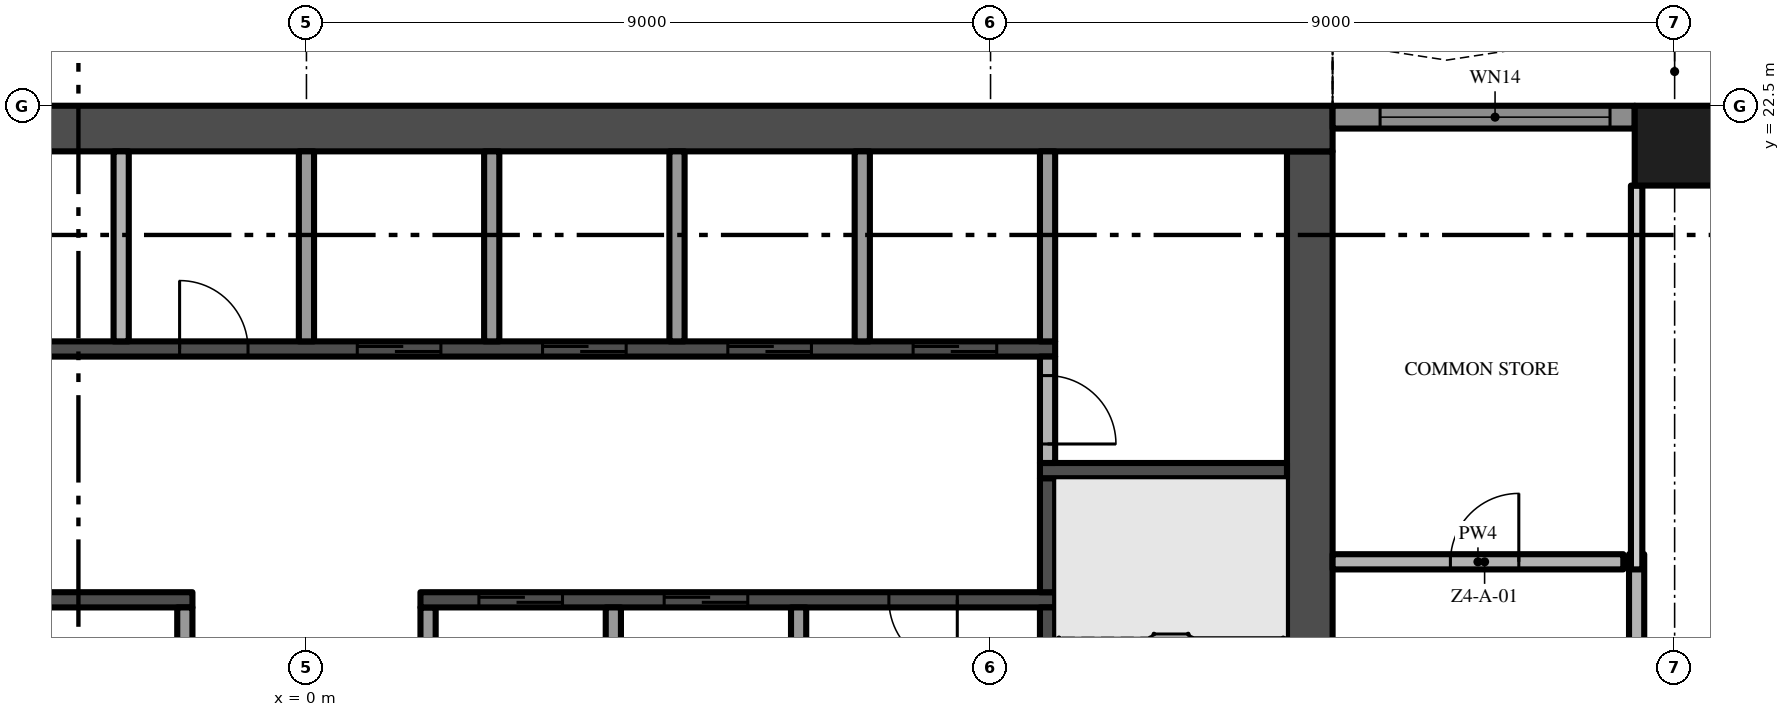
"""IFC4 building model, lengths in metres.
Left out: names, types, materials, properties, quantities, classifications, styles, units other than length and angle.
Written with IfcOpenShell. Run it as: python <this file> out.ifc"""

import sys

from ifc_helpers import new_model, si_unit, direction, frame, frame_2d, origin, origin_2d, place, context, subcontext, project, spatial, polyline, rectangle, outline, extrude, element, fill, save


model = new_model("IFC4")
c1 = context("Model", 3, precision=1e-05, world=origin(), true_north=direction((0.0, 1.0)))
c2 = subcontext(c1, "Body", "Model", "MODEL_VIEW")
j1 = project(units=[si_unit("LENGTHUNIT", "METRE"), si_unit("PLANEANGLEUNIT", "RADIAN")], contexts=[c1])
p1 = place(None, origin())
s1 = spatial("IfcSite", under=j1, at=p1, CompositionType="ELEMENT")
p2 = place(p1, origin())
s2 = spatial("IfcBuilding", under=s1, at=p2, CompositionType="ELEMENT")
p3 = place(p2, frame((0.0, 0.0, 188.2)))
s3 = spatial("IfcBuildingStorey", under=s2, at=p3, CompositionType="ELEMENT", Elevation=188.2)
p4 = place(p3, frame((13.2, 5.1, -0.3), z_axis=(0.0, 0.0, 1.0), x_axis=(0.0, 1.0, 0.0)))
e1 = element("IfcWall", 1, at=p4, inside=s3, PredefinedType="SHEAR", context=c2, shape_type="SweptSolid", body=[
    extrude(rectangle(XDim=16.8, YDim=0.6, at=frame_2d((8.4, 0.0))), origin(), (0.0, 0.0, 1.0), 3.8),
])
p5 = place(p4, frame((6.3, 0.0, 0.3)))
e2 = element("IfcOpeningElement", 2, at=p5, cuts=e1, PredefinedType="OPENING", context=c2, shape_type="SweptSolid", body=[
    extrude(rectangle(XDim=1.2, YDim=2.2, at=frame_2d((0.6, 1.1))), frame((0.0, 0.31, 0.0), z_axis=(0.0, -1.0, 0.0), x_axis=(1.0, 0.0, 0.0)), (0.0, 0.0, 1.0), 0.62),
])
p6 = place(p3, frame((13.5, 22.2, -0.3), z_axis=(0.0, 0.0, 1.0), x_axis=(-1.0, 0.0, 0.0)))
e3 = element("IfcWall", 3, at=p6, inside=s3, PredefinedType="SHEAR", context=c2, shape_type="SweptSolid", body=[
    extrude(rectangle(XDim=27.0, YDim=0.6, at=frame_2d((13.5, 0.0))), origin(), (0.0, 0.0, 1.0), 3.8),
])
p7 = place(p3, frame((18.0, 21.975, 0.0), z_axis=(0.0, 0.0, 1.0), x_axis=(1.0, 0.0, 0.0)))
e4 = element("IfcColumn", 4, at=p7, inside=s3, PredefinedType="COLUMN", context=c2, shape_type="SweptSolid", body=[
    extrude(rectangle(XDim=1.05, YDim=1.05, at=origin_2d()), origin(), (0.0, 0.0, 1.0), 3.5),
])
p8 = place(p3, frame((13.5, 22.35, 0.0), z_axis=(0.0, 0.0, 1.0), x_axis=(1.0, 0.0, 0.0)))
e5 = element("IfcWall", 5, at=p8, inside=s3, PredefinedType="SOLIDWALL", context=c2, shape_type="SweptSolid", body=[
    extrude(rectangle(XDim=3.975, YDim=0.3, at=frame_2d((1.988, 0.0))), origin(), (0.0, 0.0, 1.0), 3.5),
])
p9 = place(p8, frame((0.625, 0.0, 0.45)))
e6 = element("IfcOpeningElement", 6, at=p9, cuts=e5, PredefinedType="OPENING", context=c2, shape_type="SweptSolid", body=[
    extrude(rectangle(XDim=3.025, YDim=2.65, at=frame_2d((1.512, 1.325))), frame((0.0, 0.16, 0.0), z_axis=(0.0, -1.0, 0.0), x_axis=(1.0, 0.0, 0.0)), (0.0, 0.0, 1.0), 0.32),
])
p10 = place(p3, origin())
e7 = element("IfcWall", 7, at=p10, inside=s3, PredefinedType="USERDEFINED", context=c2, shape_type="SweptSolid", body=[
    extrude(outline(polyline([(22.5, 25.5), (21.0, 25.271), (19.5, 24.671), (18.0, 23.929), (16.5, 23.329), (15.0, 23.1), (13.5, 23.329), (13.462, 23.082), (15.0, 22.847), (16.566, 23.086), (18.102, 23.701), (19.602, 24.442), (21.066, 25.028), (22.538, 25.253), (22.5, 25.5)])), origin(), (0.0, 0.0, 1.0), 0.9),
])
p11 = place(p3, frame((-1.5, 16.0, 0.0), z_axis=(0.0, 0.0, 1.0), x_axis=(-1.0, 0.0, 0.0)))
e8 = element("IfcWall", 8, at=p11, inside=s3, PredefinedType="SHEAR", context=c2, shape_type="SweptSolid", body=[
    extrude(rectangle(XDim=8.35, YDim=0.2, at=frame_2d((4.175, 0.0))), origin(), (0.0, 0.0, 1.0), 3.5),
])
p12 = place(p11, frame((6.162, 0.0, 0.0)))
e9 = element("IfcOpeningElement", 9, at=p12, cuts=e8, PredefinedType="OPENING", context=c2, shape_type="SweptSolid", body=[
    extrude(rectangle(XDim=0.9, YDim=2.1, at=frame_2d((0.45, 1.05))), frame((0.0, 0.11, 0.0), z_axis=(0.0, -1.0, 0.0), x_axis=(1.0, 0.0, 0.0)), (0.0, 0.0, 1.0), 0.22),
])
p13 = place(p3, frame((-9.85, 19.3, 0.0), z_axis=(0.0, 0.0, 1.0), x_axis=(1.0, 0.0, 0.0)))
e10 = element("IfcWall", 10, at=p13, inside=s3, PredefinedType="SHEAR", context=c2, shape_type="SweptSolid", body=[
    extrude(rectangle(XDim=19.7, YDim=0.2, at=frame_2d((9.85, 0.0))), origin(), (0.0, 0.0, 1.0), 3.5),
])
p14 = place(p13, frame((10.519, 0.0, 0.0)))
e11 = element("IfcOpeningElement", 11, at=p14, cuts=e10, PredefinedType="OPENING", context=c2, shape_type="SweptSolid", body=[
    extrude(rectangle(XDim=1.1, YDim=2.1, at=frame_2d((0.55, 1.05))), frame((0.0, 0.11, 0.0), z_axis=(0.0, -1.0, 0.0), x_axis=(1.0, 0.0, 0.0)), (0.0, 0.0, 1.0), 0.22),
])
p15 = place(p13, frame((12.956, 0.0, 0.0)))
e12 = element("IfcOpeningElement", 12, at=p15, cuts=e10, PredefinedType="OPENING", context=c2, shape_type="SweptSolid", body=[
    extrude(rectangle(XDim=1.1, YDim=2.1, at=frame_2d((0.55, 1.05))), frame((0.0, 0.11, 0.0), z_axis=(0.0, -1.0, 0.0), x_axis=(1.0, 0.0, 0.0)), (0.0, 0.0, 1.0), 0.22),
])
p16 = place(p13, frame((15.394, 0.0, 0.0)))
e13 = element("IfcOpeningElement", 13, at=p16, cuts=e10, PredefinedType="OPENING", context=c2, shape_type="SweptSolid", body=[
    extrude(rectangle(XDim=1.1, YDim=2.1, at=frame_2d((0.55, 1.05))), frame((0.0, 0.11, 0.0), z_axis=(0.0, -1.0, 0.0), x_axis=(1.0, 0.0, 0.0)), (0.0, 0.0, 1.0), 0.22),
])
p17 = place(p13, frame((17.831, 0.0, 0.0)))
e14 = element("IfcOpeningElement", 14, at=p17, cuts=e10, PredefinedType="OPENING", context=c2, shape_type="SweptSolid", body=[
    extrude(rectangle(XDim=1.1, YDim=2.1, at=frame_2d((0.55, 1.05))), frame((0.0, 0.11, 0.0), z_axis=(0.0, -1.0, 0.0), x_axis=(1.0, 0.0, 0.0)), (0.0, 0.0, 1.0), 0.22),
])
p18 = place(p13, frame((3.306, 0.0, 0.0)))
e15 = element("IfcOpeningElement", 15, at=p18, cuts=e10, PredefinedType="OPENING", context=c2, shape_type="SweptSolid", body=[
    extrude(rectangle(XDim=0.9, YDim=2.1, at=frame_2d((0.45, 1.05))), frame((0.0, 0.11, 0.0), z_axis=(0.0, -1.0, 0.0), x_axis=(1.0, 0.0, 0.0)), (0.0, 0.0, 1.0), 0.22),
])
p19 = place(p13, frame((8.181, 0.0, 0.0)))
e16 = element("IfcOpeningElement", 16, at=p19, cuts=e10, PredefinedType="OPENING", context=c2, shape_type="SweptSolid", body=[
    extrude(rectangle(XDim=0.9, YDim=2.1, at=frame_2d((0.45, 1.05))), frame((0.0, 0.11, 0.0), z_axis=(0.0, -1.0, 0.0), x_axis=(1.0, 0.0, 0.0)), (0.0, 0.0, 1.0), 0.22),
])
p20 = place(p3, frame((-2.438, 19.4, 0.0), z_axis=(0.0, 0.0, 1.0), x_axis=(0.0, 1.0, 0.0)))
e17 = element("IfcWall", 17, at=p20, inside=s3, PredefinedType="PARTITIONING", context=c2, shape_type="SweptSolid", body=[
    extrude(rectangle(XDim=2.5, YDim=0.2, at=frame_2d((1.25, 0.0))), origin(), (0.0, 0.0, 1.0), 3.5),
])
p21 = place(p3, frame((-1.6, 13.7, 0.0), z_axis=(0.0, 0.0, 1.0), x_axis=(0.0, 1.0, 0.0)))
e18 = element("IfcWall", 18, at=p21, inside=s3, PredefinedType="PARTITIONING", context=c2, shape_type="SweptSolid", body=[
    extrude(rectangle(XDim=2.2, YDim=0.2, at=frame_2d((1.1, 0.0))), origin(), (0.0, 0.0, 1.0), 3.5),
])
p22 = place(p3, frame((0.0, 19.4, 0.0), z_axis=(0.0, 0.0, 1.0), x_axis=(0.0, 1.0, 0.0)))
e19 = element("IfcWall", 19, at=p22, inside=s3, PredefinedType="PARTITIONING", context=c2, shape_type="SweptSolid", body=[
    extrude(rectangle(XDim=2.5, YDim=0.2, at=frame_2d((1.25, 0.0))), origin(), (0.0, 0.0, 1.0), 3.5),
])
p23 = place(p3, frame((1.6, 13.7, 0.0), z_axis=(0.0, 0.0, 1.0), x_axis=(0.0, 1.0, 0.0)))
e20 = element("IfcWall", 20, at=p23, inside=s3, PredefinedType="PARTITIONING", context=c2, shape_type="SweptSolid", body=[
    extrude(rectangle(XDim=2.2, YDim=0.2, at=frame_2d((1.1, 0.0))), origin(), (0.0, 0.0, 1.0), 3.5),
])
p24 = place(p3, frame((9.85, 16.0, 0.0), z_axis=(0.0, 0.0, 1.0), x_axis=(-1.0, 0.0, 0.0)))
e21 = element("IfcWall", 21, at=p24, inside=s3, PredefinedType="SHEAR", context=c2, shape_type="SweptSolid", body=[
    extrude(rectangle(XDim=8.35, YDim=0.2, at=frame_2d((4.175, 0.0))), origin(), (0.0, 0.0, 1.0), 3.5),
])
p25 = place(p24, frame((6.481, 0.0, 0.0)))
e22 = element("IfcOpeningElement", 22, at=p25, cuts=e21, PredefinedType="OPENING", context=c2, shape_type="SweptSolid", body=[
    extrude(rectangle(XDim=1.1, YDim=2.1, at=frame_2d((0.55, 1.05))), frame((0.0, 0.11, 0.0), z_axis=(0.0, -1.0, 0.0), x_axis=(1.0, 0.0, 0.0)), (0.0, 0.0, 1.0), 0.22),
])
p26 = place(p24, frame((4.044, 0.0, 0.0)))
e23 = element("IfcOpeningElement", 23, at=p26, cuts=e21, PredefinedType="OPENING", context=c2, shape_type="SweptSolid", body=[
    extrude(rectangle(XDim=1.1, YDim=2.1, at=frame_2d((0.55, 1.05))), frame((0.0, 0.11, 0.0), z_axis=(0.0, -1.0, 0.0), x_axis=(1.0, 0.0, 0.0)), (0.0, 0.0, 1.0), 0.22),
])
p27 = place(p24, frame((1.288, 0.0, 0.0)))
e24 = element("IfcOpeningElement", 24, at=p27, cuts=e21, PredefinedType="OPENING", context=c2, shape_type="SweptSolid", body=[
    extrude(rectangle(XDim=0.9, YDim=2.1, at=frame_2d((0.45, 1.05))), frame((0.0, 0.11, 0.0), z_axis=(0.0, -1.0, 0.0), x_axis=(1.0, 0.0, 0.0)), (0.0, 0.0, 1.0), 0.22),
])
p28 = place(p3, frame((2.438, 19.4, 0.0), z_axis=(0.0, 0.0, 1.0), x_axis=(0.0, 1.0, 0.0)))
e25 = element("IfcWall", 25, at=p28, inside=s3, PredefinedType="PARTITIONING", context=c2, shape_type="SweptSolid", body=[
    extrude(rectangle(XDim=2.5, YDim=0.2, at=frame_2d((1.25, 0.0))), origin(), (0.0, 0.0, 1.0), 3.5),
])
p29 = place(p3, frame((4.037, 13.7, 0.0), z_axis=(0.0, 0.0, 1.0), x_axis=(0.0, 1.0, 0.0)))
e26 = element("IfcWall", 26, at=p29, inside=s3, PredefinedType="PARTITIONING", context=c2, shape_type="SweptSolid", body=[
    extrude(rectangle(XDim=2.2, YDim=0.2, at=frame_2d((1.1, 0.0))), origin(), (0.0, 0.0, 1.0), 3.5),
])
p30 = place(p3, frame((4.875, 19.4, 0.0), z_axis=(0.0, 0.0, 1.0), x_axis=(0.0, 1.0, 0.0)))
e27 = element("IfcWall", 27, at=p30, inside=s3, PredefinedType="PARTITIONING", context=c2, shape_type="SweptSolid", body=[
    extrude(rectangle(XDim=2.5, YDim=0.2, at=frame_2d((1.25, 0.0))), origin(), (0.0, 0.0, 1.0), 3.5),
])
p31 = place(p3, frame((6.475, 13.7, 0.0), z_axis=(0.0, 0.0, 1.0), x_axis=(0.0, 1.0, 0.0)))
e28 = element("IfcWall", 28, at=p31, inside=s3, PredefinedType="PARTITIONING", context=c2, shape_type="SweptSolid", body=[
    extrude(rectangle(XDim=2.2, YDim=0.2, at=frame_2d((1.1, 0.0))), origin(), (0.0, 0.0, 1.0), 3.5),
])
p32 = place(p3, frame((7.312, 19.4, 0.0), z_axis=(0.0, 0.0, 1.0), x_axis=(0.0, 1.0, 0.0)))
e29 = element("IfcWall", 29, at=p32, inside=s3, PredefinedType="PARTITIONING", context=c2, shape_type="SweptSolid", body=[
    extrude(rectangle(XDim=2.5, YDim=0.2, at=frame_2d((1.25, 0.0))), origin(), (0.0, 0.0, 1.0), 3.5),
])
p33 = place(p3, frame((9.75, 12.3, 0.0), z_axis=(0.0, 0.0, 1.0), x_axis=(0.0, 1.0, 0.0)))
e30 = element("IfcWall", 30, at=p33, inside=s3, PredefinedType="SHEAR", context=c2, shape_type="SweptSolid", body=[
    extrude(rectangle(XDim=3.6, YDim=0.2, at=frame_2d((1.8, 0.0))), origin(), (0.0, 0.0, 1.0), 3.5),
])
p34 = place(p3, frame((9.75, 16.1, 0.0), z_axis=(0.0, 0.0, 1.0), x_axis=(0.0, 1.0, 0.0)))
e31 = element("IfcWall", 31, at=p34, inside=s3, PredefinedType="SHEAR", context=c2, shape_type="SweptSolid", body=[
    extrude(rectangle(XDim=1.5, YDim=0.2, at=frame_2d((0.75, 0.0))), origin(), (0.0, 0.0, 1.0), 3.5),
])
p35 = place(p3, frame((9.65, 17.7, 0.0), z_axis=(0.0, 0.0, 1.0), x_axis=(1.0, 0.0, 0.0)))
e32 = element("IfcWall", 32, at=p35, inside=s3, PredefinedType="SHEAR", context=c2, shape_type="SweptSolid", body=[
    extrude(rectangle(XDim=3.25, YDim=0.2, at=frame_2d((1.625, 0.0))), origin(), (0.0, 0.0, 1.0), 3.5),
])
p36 = place(p3, frame((9.75, 19.2, 0.0), z_axis=(0.0, 0.0, 1.0), x_axis=(0.0, -1.0, 0.0)))
e33 = element("IfcWall", 33, at=p36, inside=s3, PredefinedType="PARTITIONING", context=c2, shape_type="SweptSolid", body=[
    extrude(rectangle(XDim=1.4, YDim=0.2, at=frame_2d((0.7, 0.0))), origin(), (0.0, 0.0, 1.0), 3.5),
])
p37 = place(p36, frame((0.25, 0.0, 0.0)))
e34 = element("IfcOpeningElement", 34, at=p37, cuts=e33, PredefinedType="OPENING", context=c2, shape_type="SweptSolid", body=[
    extrude(rectangle(XDim=0.9, YDim=2.1, at=frame_2d((0.45, 1.05))), frame((0.0, 0.11, 0.0), z_axis=(0.0, -1.0, 0.0), x_axis=(1.0, 0.0, 0.0)), (0.0, 0.0, 1.0), 0.22),
])
p38 = place(p3, frame((9.75, 19.4, 0.0), z_axis=(0.0, 0.0, 1.0), x_axis=(0.0, 1.0, 0.0)))
e35 = element("IfcWall", 35, at=p38, inside=s3, PredefinedType="PARTITIONING", context=c2, shape_type="SweptSolid", body=[
    extrude(rectangle(XDim=2.5, YDim=0.2, at=frame_2d((1.25, 0.0))), origin(), (0.0, 0.0, 1.0), 3.5),
])
p39 = place(p3, frame((13.5, 16.5, 0.0), z_axis=(0.0, 0.0, 1.0), x_axis=(1.0, 0.0, 0.0)))
e36 = element("IfcWall", 36, at=p39, inside=s3, PredefinedType="PARTITIONING", context=c2, shape_type="SweptSolid", body=[
    extrude(rectangle(XDim=3.825, YDim=0.2, at=frame_2d((1.913, 0.0))), origin(), (0.0, 0.0, 1.0), 3.5),
])
p40 = place(p39, frame((1.55, 0.0, 0.0)))
e37 = element("IfcOpeningElement", 37, at=p40, cuts=e36, PredefinedType="OPENING", context=c2, shape_type="SweptSolid", body=[
    extrude(rectangle(XDim=0.9, YDim=2.1, at=frame_2d((0.45, 1.05))), frame((0.0, 0.11, 0.0), z_axis=(0.0, -1.0, 0.0), x_axis=(1.0, 0.0, 0.0)), (0.0, 0.0, 1.0), 0.22),
])
p41 = place(p3, frame((17.5, 16.6, 0.0), z_axis=(0.0, 0.0, 1.0), x_axis=(0.0, -1.0, 0.0)))
e38 = element("IfcWall", 38, at=p41, inside=s3, PredefinedType="PARTITIONING", context=c2, shape_type="SweptSolid", body=[
    extrude(rectangle(XDim=2.525, YDim=0.2, at=frame_2d((1.262, 0.0))), origin(), (0.0, 0.0, 1.0), 3.5),
])
p42 = place(p41, frame((1.175, 0.0, 0.0)))
e39 = element("IfcOpeningElement", 39, at=p42, cuts=e38, PredefinedType="OPENING", context=c2, shape_type="SweptSolid", body=[
    extrude(rectangle(XDim=1.2, YDim=2.4, at=frame_2d((0.6, 1.2))), frame((0.0, 0.11, 0.0), z_axis=(0.0, -1.0, 0.0), x_axis=(1.0, 0.0, 0.0)), (0.0, 0.0, 1.0), 0.22),
])
p43 = place(p3, frame((17.5, 16.4, 0.0), z_axis=(0.0, 0.0, 1.0), x_axis=(0.0, 1.0, 0.0)))
e40 = element("IfcWall", 40, at=p43, inside=s3, PredefinedType="PARTITIONING", context=c2, shape_type="SweptSolid", body=[
    extrude(rectangle(XDim=5.05, YDim=0.15, at=frame_2d((2.525, 0.0))), origin(), (0.0, 0.0, 1.0), 3.5),
])
p44 = place(p9, origin())
e41 = element("IfcWindow", 41, at=p44, inside=s3, PartitioningType="SINGLE_PANEL", PredefinedType="WINDOW", context=c2, shape_type="SweptSolid", body=[
    extrude(rectangle(XDim=3.025, YDim=2.65, at=frame_2d((1.512, 1.325))), frame((0.0, 0.03, 0.0), z_axis=(0.0, -1.0, 0.0), x_axis=(1.0, 0.0, 0.0)), (0.0, 0.0, 1.0), 0.06),
])
fill(e6, e41)
p45 = place(p14, origin())
e42 = element("IfcDoor", 42, at=p45, inside=s3, OperationType="SLIDING_TO_RIGHT", PredefinedType="DOOR", context=c2, shape_type="SweptSolid", body=[
    extrude(rectangle(XDim=1.1, YDim=2.1, at=frame_2d((0.55, 1.05))), frame((0.0, 0.025, 0.0), z_axis=(0.0, -1.0, 0.0), x_axis=(1.0, 0.0, 0.0)), (0.0, 0.0, 1.0), 0.05),
])
fill(e11, e42)
p46 = place(p15, origin())
e43 = element("IfcDoor", 43, at=p46, inside=s3, OperationType="SLIDING_TO_RIGHT", PredefinedType="DOOR", context=c2, shape_type="SweptSolid", body=[
    extrude(rectangle(XDim=1.1, YDim=2.1, at=frame_2d((0.55, 1.05))), frame((0.0, 0.025, 0.0), z_axis=(0.0, -1.0, 0.0), x_axis=(1.0, 0.0, 0.0)), (0.0, 0.0, 1.0), 0.05),
])
fill(e12, e43)
p47 = place(p16, origin())
e44 = element("IfcDoor", 44, at=p47, inside=s3, OperationType="SLIDING_TO_RIGHT", PredefinedType="DOOR", context=c2, shape_type="SweptSolid", body=[
    extrude(rectangle(XDim=1.1, YDim=2.1, at=frame_2d((0.55, 1.05))), frame((0.0, 0.025, 0.0), z_axis=(0.0, -1.0, 0.0), x_axis=(1.0, 0.0, 0.0)), (0.0, 0.0, 1.0), 0.05),
])
fill(e13, e44)
p48 = place(p17, origin())
e45 = element("IfcDoor", 45, at=p48, inside=s3, OperationType="SLIDING_TO_RIGHT", PredefinedType="DOOR", context=c2, shape_type="SweptSolid", body=[
    extrude(rectangle(XDim=1.1, YDim=2.1, at=frame_2d((0.55, 1.05))), frame((0.0, 0.025, 0.0), z_axis=(0.0, -1.0, 0.0), x_axis=(1.0, 0.0, 0.0)), (0.0, 0.0, 1.0), 0.05),
])
fill(e14, e45)
p49 = place(p25, origin())
e46 = element("IfcDoor", 46, at=p49, inside=s3, OperationType="SLIDING_TO_RIGHT", PredefinedType="DOOR", context=c2, shape_type="SweptSolid", body=[
    extrude(rectangle(XDim=1.1, YDim=2.1, at=frame_2d((0.55, 1.05))), frame((0.0, 0.025, 0.0), z_axis=(0.0, -1.0, 0.0), x_axis=(1.0, 0.0, 0.0)), (0.0, 0.0, 1.0), 0.05),
])
fill(e22, e46)
p50 = place(p26, origin())
e47 = element("IfcDoor", 47, at=p50, inside=s3, OperationType="SLIDING_TO_RIGHT", PredefinedType="DOOR", context=c2, shape_type="SweptSolid", body=[
    extrude(rectangle(XDim=1.1, YDim=2.1, at=frame_2d((0.55, 1.05))), frame((0.0, 0.025, 0.0), z_axis=(0.0, -1.0, 0.0), x_axis=(1.0, 0.0, 0.0)), (0.0, 0.0, 1.0), 0.05),
])
fill(e23, e47)
p51 = place(p27, origin())
e48 = element("IfcDoor", 48, at=p51, inside=s3, OperationType="SINGLE_SWING_LEFT", PredefinedType="DOOR", context=c2, shape_type="SweptSolid", body=[
    extrude(rectangle(XDim=0.9, YDim=2.1, at=frame_2d((0.45, 1.05))), frame((0.0, 0.025, 0.0), z_axis=(0.0, -1.0, 0.0), x_axis=(1.0, 0.0, 0.0)), (0.0, 0.0, 1.0), 0.05),
])
fill(e24, e48)
p52 = place(p37, origin())
e49 = element("IfcDoor", 49, at=p52, inside=s3, OperationType="SINGLE_SWING_RIGHT", PredefinedType="DOOR", context=c2, shape_type="SweptSolid", body=[
    extrude(rectangle(XDim=0.9, YDim=2.1, at=frame_2d((0.45, 1.05))), frame((0.0, 0.025, 0.0), z_axis=(0.0, -1.0, 0.0), x_axis=(1.0, 0.0, 0.0)), (0.0, 0.0, 1.0), 0.05),
])
fill(e34, e49)
p53 = place(p19, origin())
e50 = element("IfcDoor", 50, at=p53, inside=s3, OperationType="SINGLE_SWING_LEFT", PredefinedType="DOOR", context=c2, shape_type="SweptSolid", body=[
    extrude(rectangle(XDim=0.9, YDim=2.1, at=frame_2d((0.45, 1.05))), frame((0.0, 0.025, 0.0), z_axis=(0.0, -1.0, 0.0), x_axis=(1.0, 0.0, 0.0)), (0.0, 0.0, 1.0), 0.05),
])
fill(e16, e50)
p54 = place(p40, origin())
e51 = element("IfcDoor", 51, at=p54, inside=s3, OperationType="SINGLE_SWING_RIGHT", PredefinedType="DOOR", context=c2, shape_type="SweptSolid", body=[
    extrude(rectangle(XDim=0.9, YDim=2.1, at=frame_2d((0.45, 1.05))), frame((0.0, 0.025, 0.0), z_axis=(0.0, -1.0, 0.0), x_axis=(1.0, 0.0, 0.0)), (0.0, 0.0, 1.0), 0.05),
])
fill(e37, e51)
save(model, sys.argv[1])
